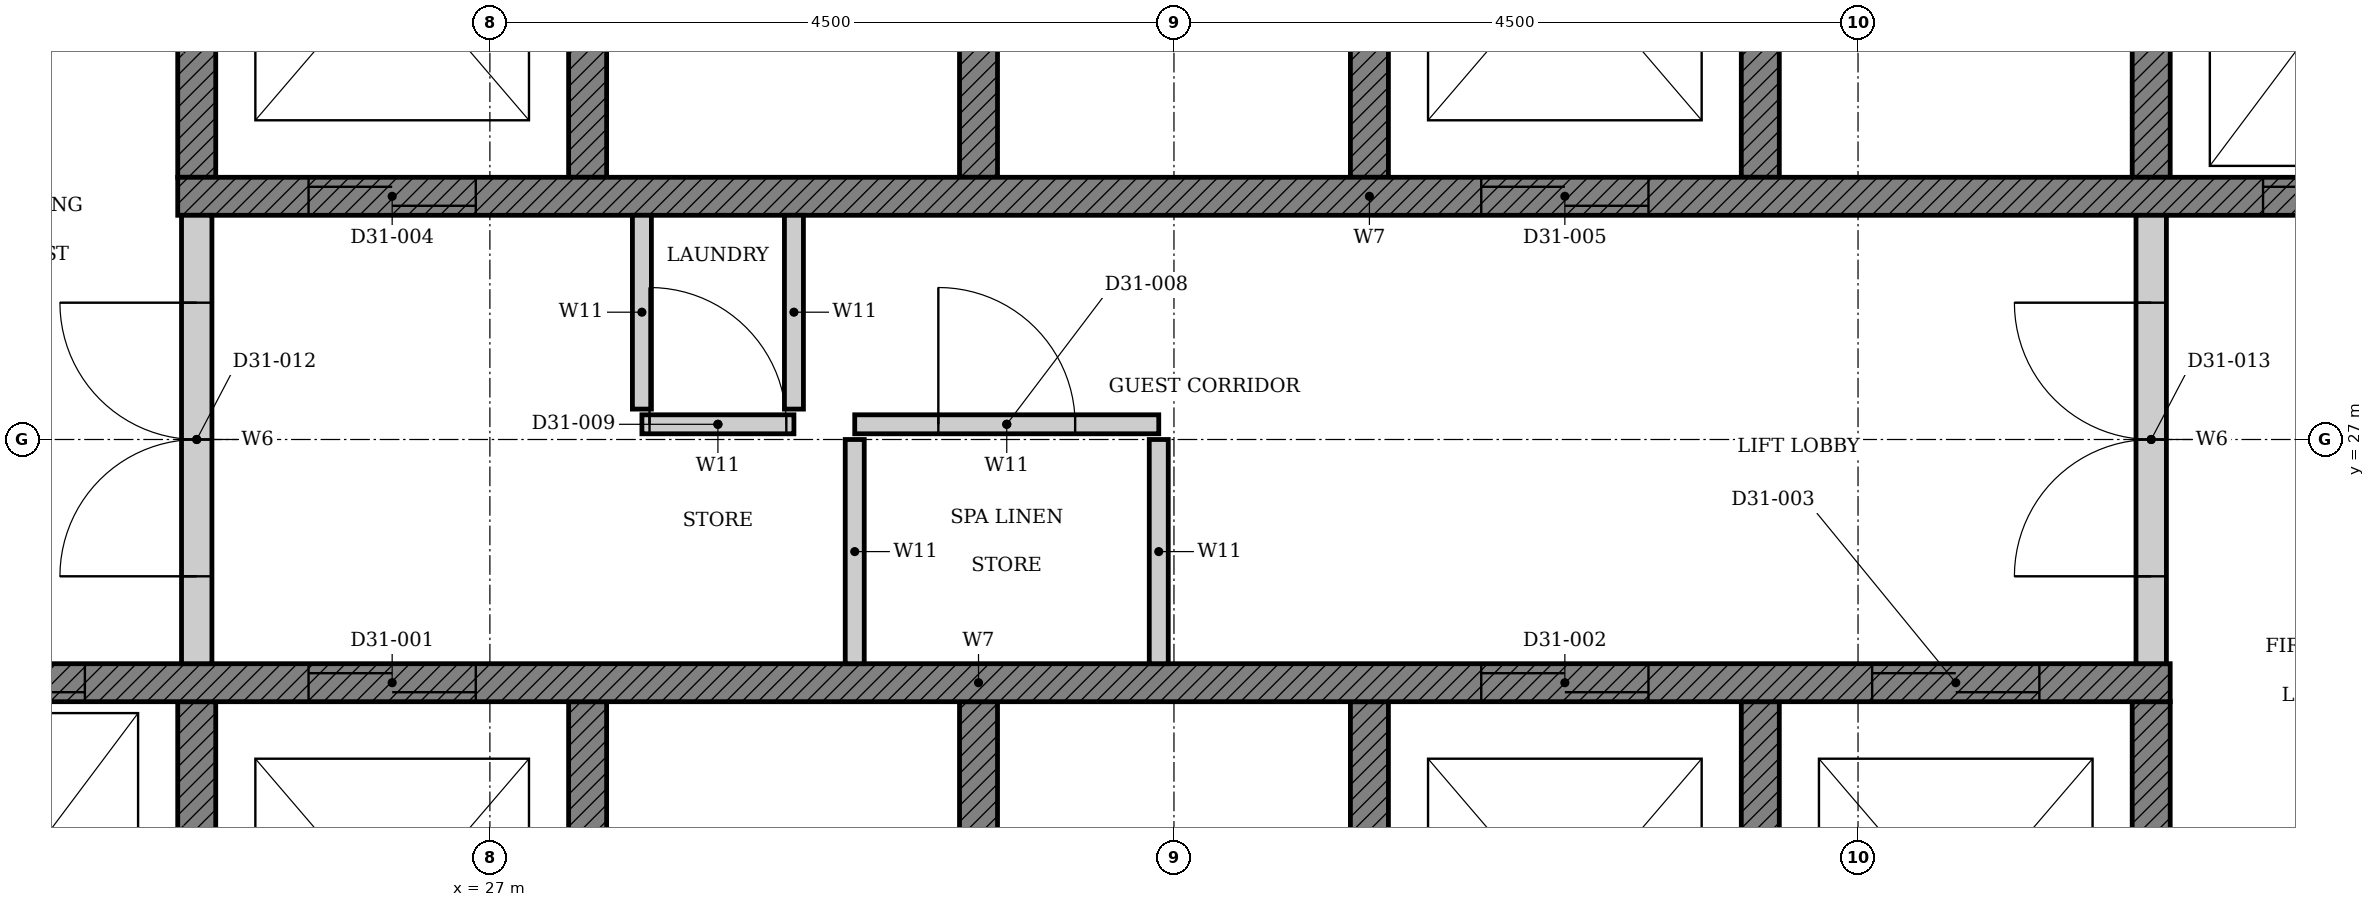
"""IFC4 building model, lengths in metres.
Left out: names, types, materials, properties, quantities, classifications, styles, units other than length and angle.
Written with IfcOpenShell. Run it as: python <this file> out.ifc"""

import sys

from ifc_helpers import new_model, si_unit, direction, frame, frame_2d, origin, place, context, subcontext, project, spatial, polyline, rectangle, outline, extrude, element, fill, save


model = new_model("IFC4")
c1 = context("Model", 3, precision=1e-05, world=origin(), true_north=direction((0.0, 1.0)))
c2 = subcontext(c1, "Body", "Model", "MODEL_VIEW")
j1 = project(units=[si_unit("LENGTHUNIT", "METRE"), si_unit("PLANEANGLEUNIT", "RADIAN")], contexts=[c1])
p1 = place(None, origin())
s1 = spatial("IfcSite", under=j1, at=p1, CompositionType="ELEMENT")
p2 = place(p1, origin())
s2 = spatial("IfcBuilding", under=s1, at=p2, CompositionType="ELEMENT")
p3 = place(p2, frame((0.0, 0.0, 126.0)))
s3 = spatial("IfcBuildingStorey", under=s2, at=p3, CompositionType="ELEMENT", Elevation=126.0)
p4 = place(p3, origin())
e1 = element("IfcWall", 1, at=p4, inside=s3, PredefinedType="SHEAR", context=c2, shape_type="SweptSolid", body=[
    extrude(outline(polyline([(22.375, 22.35), (38.053, 22.35), (38.053, 25.275), (37.803, 25.275), (37.803, 22.65), (35.482, 22.65), (35.482, 25.275), (35.232, 25.275), (35.232, 22.65), (32.911, 22.65), (32.911, 25.275), (32.661, 25.275), (32.661, 22.65), (30.339, 22.65), (30.339, 25.275), (30.089, 25.275), (30.089, 22.65), (27.768, 22.65), (27.768, 25.275), (27.518, 25.275), (27.518, 22.65), (25.197, 22.65), (25.197, 25.275), (24.947, 25.275), (24.947, 22.65), (22.625, 22.65), (22.625, 25.275), (22.375, 25.275), (22.375, 22.35)])), origin(), (0.0, 0.0, 1.0), 3.3),
])
p5 = place(p3, origin())
e2 = element("IfcWall", 2, at=p5, inside=s3, PredefinedType="SHEAR", context=c2, shape_type="SweptSolid", body=[
    extrude(outline(polyline([(24.947, 28.725), (25.197, 28.725), (25.197, 31.35), (27.518, 31.35), (27.518, 28.725), (27.768, 28.725), (27.768, 31.35), (30.089, 31.35), (30.089, 28.725), (30.339, 28.725), (30.339, 31.35), (32.661, 31.35), (32.661, 28.725), (32.911, 28.725), (32.911, 31.35), (35.232, 31.35), (35.232, 28.725), (35.482, 28.725), (35.482, 31.35), (37.803, 31.35), (37.803, 28.725), (38.053, 28.725), (38.053, 31.35), (40.375, 31.35), (40.375, 28.725), (40.625, 28.725), (40.625, 31.65), (24.947, 31.65), (24.947, 28.725)])), origin(), (0.0, 0.0, 1.0), 3.3),
])
p6 = place(p3, frame((22.375, 25.4, 0.0), z_axis=(0.0, 0.0, 1.0), x_axis=(1.0, 0.0, 0.0)))
e3 = element("IfcWall", 3, at=p6, inside=s3, PredefinedType="SHEAR", context=c2, shape_type="SweptSolid", body=[
    extrude(rectangle(XDim=15.678, YDim=0.25, at=frame_2d((7.839, 0.0))), origin(), (0.0, 0.0, 1.0), 3.3),
])
p7 = place(p6, frame((3.432, 0.0, 0.0)))
e4 = element("IfcOpeningElement", 4, at=p7, cuts=e3, PredefinedType="OPENING", context=c2, shape_type="SweptSolid", body=[
    extrude(rectangle(XDim=1.1, YDim=2.1, at=frame_2d((0.55, 1.05))), frame((0.0, 0.135, 0.0), z_axis=(0.0, -1.0, 0.0), x_axis=(1.0, 0.0, 0.0)), (0.0, 0.0, 1.0), 0.27),
])
p8 = place(p6, frame((11.146, 0.0, 0.0)))
e5 = element("IfcOpeningElement", 5, at=p8, cuts=e3, PredefinedType="OPENING", context=c2, shape_type="SweptSolid", body=[
    extrude(rectangle(XDim=1.1, YDim=2.1, at=frame_2d((0.55, 1.05))), frame((0.0, 0.135, 0.0), z_axis=(0.0, -1.0, 0.0), x_axis=(1.0, 0.0, 0.0)), (0.0, 0.0, 1.0), 0.27),
])
p9 = place(p6, frame((13.718, 0.0, 0.0)))
e6 = element("IfcOpeningElement", 6, at=p9, cuts=e3, PredefinedType="OPENING", context=c2, shape_type="SweptSolid", body=[
    extrude(rectangle(XDim=1.1, YDim=2.1, at=frame_2d((0.55, 1.05))), frame((0.0, 0.135, 0.0), z_axis=(0.0, -1.0, 0.0), x_axis=(1.0, 0.0, 0.0)), (0.0, 0.0, 1.0), 0.27),
])
p10 = place(p6, frame((0.861, 0.0, 0.0)))
e7 = element("IfcOpeningElement", 7, at=p10, cuts=e3, PredefinedType="OPENING", context=c2, shape_type="SweptSolid", body=[
    extrude(rectangle(XDim=1.1, YDim=2.1, at=frame_2d((0.55, 1.05))), frame((0.0, 0.135, 0.0), z_axis=(0.0, -1.0, 0.0), x_axis=(1.0, 0.0, 0.0)), (0.0, 0.0, 1.0), 0.27),
])
p11 = place(p3, frame((24.947, 28.6, 0.0), z_axis=(0.0, 0.0, 1.0), x_axis=(1.0, 0.0, 0.0)))
e8 = element("IfcWall", 8, at=p11, inside=s3, PredefinedType="SHEAR", context=c2, shape_type="SweptSolid", body=[
    extrude(rectangle(XDim=15.678, YDim=0.25, at=frame_2d((7.839, 0.0))), origin(), (0.0, 0.0, 1.0), 3.3),
])
p12 = place(p11, frame((0.861, 0.0, 0.0)))
e9 = element("IfcOpeningElement", 9, at=p12, cuts=e8, PredefinedType="OPENING", context=c2, shape_type="SweptSolid", body=[
    extrude(rectangle(XDim=1.1, YDim=2.1, at=frame_2d((0.55, 1.05))), frame((0.0, 0.135, 0.0), z_axis=(0.0, -1.0, 0.0), x_axis=(1.0, 0.0, 0.0)), (0.0, 0.0, 1.0), 0.27),
])
p13 = place(p11, frame((8.575, 0.0, 0.0)))
e10 = element("IfcOpeningElement", 10, at=p13, cuts=e8, PredefinedType="OPENING", context=c2, shape_type="SweptSolid", body=[
    extrude(rectangle(XDim=1.1, YDim=2.1, at=frame_2d((0.55, 1.05))), frame((0.0, 0.135, 0.0), z_axis=(0.0, -1.0, 0.0), x_axis=(1.0, 0.0, 0.0)), (0.0, 0.0, 1.0), 0.27),
])
p14 = place(p11, frame((13.718, 0.0, 0.0)))
e11 = element("IfcOpeningElement", 11, at=p14, cuts=e8, PredefinedType="OPENING", context=c2, shape_type="SweptSolid", body=[
    extrude(rectangle(XDim=1.1, YDim=2.1, at=frame_2d((0.55, 1.05))), frame((0.0, 0.135, 0.0), z_axis=(0.0, -1.0, 0.0), x_axis=(1.0, 0.0, 0.0)), (0.0, 0.0, 1.0), 0.27),
])
p15 = place(p3, frame((29.4, 27.1, 0.0), z_axis=(0.0, 0.0, 1.0), x_axis=(1.0, 0.0, 0.0)))
e12 = element("IfcWall", 12, at=p15, inside=s3, PredefinedType="PARTITIONING", context=c2, shape_type="SweptSolid", body=[
    extrude(rectangle(XDim=2.0, YDim=0.125, at=frame_2d((1.0, 0.0))), origin(), (0.0, 0.0, 1.0), 3.3),
])
p16 = place(p15, frame((0.55, 0.0, 0.0)))
e13 = element("IfcOpeningElement", 13, at=p16, cuts=e12, PredefinedType="OPENING", context=c2, shape_type="SweptSolid", body=[
    extrude(rectangle(XDim=0.9, YDim=2.1, at=frame_2d((0.45, 1.05))), frame((0.0, 0.073, 0.0), z_axis=(0.0, -1.0, 0.0), x_axis=(1.0, 0.0, 0.0)), (0.0, 0.0, 1.0), 0.145),
])
for number, where, z_axis, x_axis in (
    (14, (29.4, 25.525, 0.0), (0.0, 0.0, 1.0), (0.0, 1.0, 0.0)),
    (15, (31.4, 25.525, 0.0), (0.0, 0.0, 1.0), (0.0, 1.0, 0.0)),
):
    element("IfcWall", number, at=place(p3, frame(where, z_axis=z_axis, x_axis=x_axis)), inside=s3, PredefinedType="PARTITIONING", context=c2, shape_type="SweptSolid", body=[
        extrude(rectangle(XDim=1.475, YDim=0.125, at=frame_2d((0.738, 0.0))), origin(), (0.0, 0.0, 1.0), 3.3),
    ])
p17 = place(p3, frame((28.0, 27.1, 0.0), z_axis=(0.0, 0.0, 1.0), x_axis=(1.0, 0.0, 0.0)))
e16 = element("IfcWall", 16, at=p17, inside=s3, PredefinedType="PARTITIONING", context=c2, shape_type="SweptSolid", body=[
    extrude(rectangle(XDim=1.0, YDim=0.125, at=frame_2d((0.5, 0.0))), origin(), (0.0, 0.0, 1.0), 3.3),
])
p18 = place(p17, frame((0.05, 0.0, 0.0)))
e17 = element("IfcOpeningElement", 17, at=p18, cuts=e16, PredefinedType="OPENING", context=c2, shape_type="SweptSolid", body=[
    extrude(rectangle(XDim=0.9, YDim=2.1, at=frame_2d((0.45, 1.05))), frame((0.0, 0.073, 0.0), z_axis=(0.0, -1.0, 0.0), x_axis=(1.0, 0.0, 0.0)), (0.0, 0.0, 1.0), 0.145),
])
for number, where, z_axis, x_axis in (
    (18, (28.0, 28.475, 0.0), (0.0, 0.0, 1.0), (0.0, -1.0, 0.0)),
    (19, (29.0, 28.475, 0.0), (0.0, 0.0, 1.0), (0.0, -1.0, 0.0)),
):
    element("IfcWall", number, at=place(p3, frame(where, z_axis=z_axis, x_axis=x_axis)), inside=s3, PredefinedType="PARTITIONING", context=c2, shape_type="SweptSolid", body=[
        extrude(rectangle(XDim=1.275, YDim=0.125, at=frame_2d((0.638, 0.0))), origin(), (0.0, 0.0, 1.0), 3.3),
    ])
p19 = place(p3, frame((25.072, 25.525, 0.0), z_axis=(0.0, 0.0, 1.0), x_axis=(0.0, 1.0, 0.0)))
e20 = element("IfcWall", 20, at=p19, inside=s3, PredefinedType="PARTITIONING", context=c2, shape_type="SweptSolid", body=[
    extrude(rectangle(XDim=2.95, YDim=0.2, at=frame_2d((1.475, 0.0))), origin(), (0.0, 0.0, 1.0), 3.3),
])
p20 = place(p19, frame((0.575, 0.0, 0.0)))
e21 = element("IfcOpeningElement", 21, at=p20, cuts=e20, PredefinedType="OPENING", context=c2, shape_type="SweptSolid", body=[
    extrude(rectangle(XDim=1.8, YDim=2.1, at=frame_2d((0.9, 1.05))), frame((0.0, 0.11, 0.0), z_axis=(0.0, -1.0, 0.0), x_axis=(1.0, 0.0, 0.0)), (0.0, 0.0, 1.0), 0.22),
])
p21 = place(p3, frame((37.928, 25.525, 0.0), z_axis=(0.0, 0.0, 1.0), x_axis=(0.0, 1.0, 0.0)))
e22 = element("IfcWall", 22, at=p21, inside=s3, PredefinedType="PARTITIONING", context=c2, shape_type="SweptSolid", body=[
    extrude(rectangle(XDim=2.95, YDim=0.2, at=frame_2d((1.475, 0.0))), origin(), (0.0, 0.0, 1.0), 3.3),
])
p22 = place(p21, frame((0.575, 0.0, 0.0)))
e23 = element("IfcOpeningElement", 23, at=p22, cuts=e22, PredefinedType="OPENING", context=c2, shape_type="SweptSolid", body=[
    extrude(rectangle(XDim=1.8, YDim=2.1, at=frame_2d((0.9, 1.05))), frame((0.0, 0.11, 0.0), z_axis=(0.0, -1.0, 0.0), x_axis=(1.0, 0.0, 0.0)), (0.0, 0.0, 1.0), 0.22),
])
p23 = place(p7, origin())
e24 = element("IfcDoor", 24, at=p23, inside=s3, OperationType="DOUBLE_DOOR_SLIDING", PredefinedType="DOOR", context=c2, shape_type="SweptSolid", body=[
    extrude(rectangle(XDim=1.1, YDim=2.1, at=frame_2d((0.55, 1.05))), frame((0.0, 0.025, 0.0), z_axis=(0.0, -1.0, 0.0), x_axis=(1.0, 0.0, 0.0)), (0.0, 0.0, 1.0), 0.05),
])
fill(e4, e24)
p24 = place(p8, origin())
e25 = element("IfcDoor", 25, at=p24, inside=s3, OperationType="DOUBLE_DOOR_SLIDING", PredefinedType="DOOR", context=c2, shape_type="SweptSolid", body=[
    extrude(rectangle(XDim=1.1, YDim=2.1, at=frame_2d((0.55, 1.05))), frame((0.0, 0.025, 0.0), z_axis=(0.0, -1.0, 0.0), x_axis=(1.0, 0.0, 0.0)), (0.0, 0.0, 1.0), 0.05),
])
fill(e5, e25)
p25 = place(p9, origin())
e26 = element("IfcDoor", 26, at=p25, inside=s3, OperationType="DOUBLE_DOOR_SLIDING", PredefinedType="DOOR", context=c2, shape_type="SweptSolid", body=[
    extrude(rectangle(XDim=1.1, YDim=2.1, at=frame_2d((0.55, 1.05))), frame((0.0, 0.025, 0.0), z_axis=(0.0, -1.0, 0.0), x_axis=(1.0, 0.0, 0.0)), (0.0, 0.0, 1.0), 0.05),
])
fill(e6, e26)
p26 = place(p12, origin())
e27 = element("IfcDoor", 27, at=p26, inside=s3, OperationType="DOUBLE_DOOR_SLIDING", PredefinedType="DOOR", context=c2, shape_type="SweptSolid", body=[
    extrude(rectangle(XDim=1.1, YDim=2.1, at=frame_2d((0.55, 1.05))), frame((0.0, 0.025, 0.0), z_axis=(0.0, -1.0, 0.0), x_axis=(1.0, 0.0, 0.0)), (0.0, 0.0, 1.0), 0.05),
])
fill(e9, e27)
p27 = place(p13, origin())
e28 = element("IfcDoor", 28, at=p27, inside=s3, OperationType="DOUBLE_DOOR_SLIDING", PredefinedType="DOOR", context=c2, shape_type="SweptSolid", body=[
    extrude(rectangle(XDim=1.1, YDim=2.1, at=frame_2d((0.55, 1.05))), frame((0.0, 0.025, 0.0), z_axis=(0.0, -1.0, 0.0), x_axis=(1.0, 0.0, 0.0)), (0.0, 0.0, 1.0), 0.05),
])
fill(e10, e28)
p28 = place(p10, origin())
e29 = element("IfcDoor", 29, at=p28, inside=s3, OperationType="DOUBLE_DOOR_SLIDING", PredefinedType="DOOR", context=c2, shape_type="SweptSolid", body=[
    extrude(rectangle(XDim=1.1, YDim=2.1, at=frame_2d((0.55, 1.05))), frame((0.0, 0.025, 0.0), z_axis=(0.0, -1.0, 0.0), x_axis=(1.0, 0.0, 0.0)), (0.0, 0.0, 1.0), 0.05),
])
fill(e7, e29)
p29 = place(p14, origin())
e30 = element("IfcDoor", 30, at=p29, inside=s3, OperationType="DOUBLE_DOOR_SLIDING", PredefinedType="DOOR", context=c2, shape_type="SweptSolid", body=[
    extrude(rectangle(XDim=1.1, YDim=2.1, at=frame_2d((0.55, 1.05))), frame((0.0, 0.025, 0.0), z_axis=(0.0, -1.0, 0.0), x_axis=(1.0, 0.0, 0.0)), (0.0, 0.0, 1.0), 0.05),
])
fill(e11, e30)
p30 = place(p16, origin())
e31 = element("IfcDoor", 31, at=p30, inside=s3, OperationType="SINGLE_SWING_LEFT", PredefinedType="DOOR", context=c2, shape_type="SweptSolid", body=[
    extrude(rectangle(XDim=0.9, YDim=2.1, at=frame_2d((0.45, 1.05))), frame((0.0, 0.025, 0.0), z_axis=(0.0, -1.0, 0.0), x_axis=(1.0, 0.0, 0.0)), (0.0, 0.0, 1.0), 0.05),
])
fill(e13, e31)
p31 = place(p18, origin())
e32 = element("IfcDoor", 32, at=p31, inside=s3, OperationType="SINGLE_SWING_LEFT", PredefinedType="DOOR", context=c2, shape_type="SweptSolid", body=[
    extrude(rectangle(XDim=0.9, YDim=2.1, at=frame_2d((0.45, 1.05))), frame((0.0, 0.025, 0.0), z_axis=(0.0, -1.0, 0.0), x_axis=(1.0, 0.0, 0.0)), (0.0, 0.0, 1.0), 0.05),
])
fill(e17, e32)
p32 = place(p20, origin())
e33 = element("IfcDoor", 33, at=p32, inside=s3, OperationType="DOUBLE_DOOR_SINGLE_SWING", PredefinedType="DOOR", context=c2, shape_type="SweptSolid", body=[
    extrude(rectangle(XDim=1.8, YDim=2.1, at=frame_2d((0.9, 1.05))), frame((0.0, 0.025, 0.0), z_axis=(0.0, -1.0, 0.0), x_axis=(1.0, 0.0, 0.0)), (0.0, 0.0, 1.0), 0.05),
])
fill(e21, e33)
p33 = place(p22, origin())
e34 = element("IfcDoor", 34, at=p33, inside=s3, OperationType="DOUBLE_DOOR_SINGLE_SWING", PredefinedType="DOOR", context=c2, shape_type="SweptSolid", body=[
    extrude(rectangle(XDim=1.8, YDim=2.1, at=frame_2d((0.9, 1.05))), frame((0.0, 0.025, 0.0), z_axis=(0.0, -1.0, 0.0), x_axis=(1.0, 0.0, 0.0)), (0.0, 0.0, 1.0), 0.05),
])
fill(e23, e34)
save(model, sys.argv[1])
